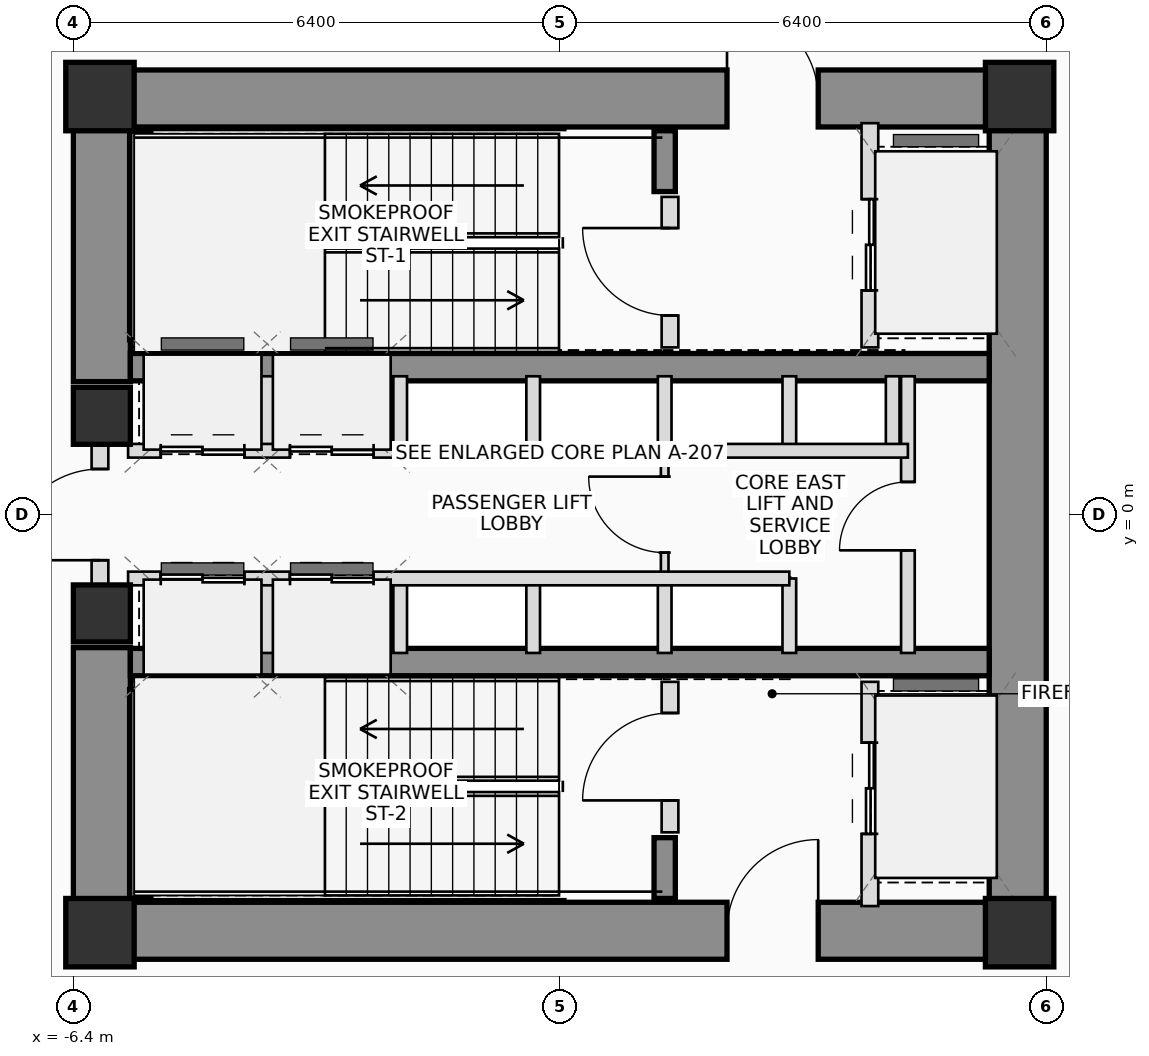
"""IFC4 building model, lengths in metres.
Left out: names, types, materials, properties, quantities, classifications, styles, units other than length and angle.
Written with IfcOpenShell. Run it as: python <this file> out.ifc"""

import sys

from ifc_helpers import new_model, si_unit, direction, frame, frame_2d, origin, origin_2d, place, context, subcontext, project, spatial, rectangle, extrude, source, transform, mapped, element, fill, save


model = new_model("IFC4")
c1 = context("Model", 3, precision=1e-05, world=origin(), true_north=direction((0.0, 1.0)))
c2 = subcontext(c1, "Body", "Model", "MODEL_VIEW")
j1 = project(units=[si_unit("LENGTHUNIT", "METRE"), si_unit("PLANEANGLEUNIT", "RADIAN")], contexts=[c1])
p1 = place(None, origin())
s1 = spatial("IfcSite", under=j1, at=p1, CompositionType="ELEMENT")
p2 = place(p1, origin())
s2 = spatial("IfcBuilding", under=s1, at=p2, CompositionType="ELEMENT")
p3 = place(p2, frame((0.0, 0.0, 77.3)))
s3 = spatial("IfcBuildingStorey", under=s2, at=p3, CompositionType="ELEMENT", Elevation=77.3)
m1 = source(origin(), c2, "Body", "SweptSolid", [
    extrude(rectangle(XDim=0.9, YDim=0.9, at=origin_2d()), origin(), (0.0, 0.0, 1.0), 3.75),
])
for number, where, z_axis, x_axis in (
    (1, (-6.05, -5.5, 0.0), (0.0, 0.0, 1.0), (1.0, 0.0, 0.0)),
    (2, (6.05, -5.5, 0.0), (0.0, 0.0, 1.0), (1.0, 0.0, 0.0)),
    (3, (6.05, 5.5, 0.0), (0.0, 0.0, 1.0), (1.0, 0.0, 0.0)),
    (4, (-6.05, 5.5, 0.0), (0.0, 0.0, 1.0), (1.0, 0.0, 0.0)),
):
    element("IfcColumn", number, at=place(p3, frame(where, z_axis=z_axis, x_axis=x_axis)), inside=s3, PredefinedType="COLUMN", context=c2, shape_type="MappedRepresentation", body=[
        mapped(m1, transform((0.0, 0.0, 0.0), scale=1.0)),
    ])
p4 = place(p3, frame((-6.4, 5.475, 0.0), z_axis=(0.0, 0.0, 1.0), x_axis=(1.0, 0.0, 0.0)))
e5 = element("IfcWall", 5, at=p4, inside=s3, PredefinedType="SHEAR", context=c2, shape_type="SweptSolid", body=[
    extrude(rectangle(XDim=12.8, YDim=0.75, at=frame_2d((6.4, 0.0))), origin(), (0.0, 0.0, 1.0), 3.75),
])
p5 = place(p4, frame((8.6, 0.0, 0.0)))
e6 = element("IfcOpeningElement", 6, at=p5, cuts=e5, PredefinedType="OPENING", context=c2, shape_type="SweptSolid", body=[
    extrude(rectangle(XDim=1.2, YDim=2.2, at=frame_2d((0.6, 1.1))), frame((0.0, 0.385, 0.0), z_axis=(0.0, -1.0, 0.0), x_axis=(1.0, 0.0, 0.0)), (0.0, 0.0, 1.0), 0.77),
])
p6 = place(p3, frame((-6.4, -5.475, 0.0), z_axis=(0.0, 0.0, 1.0), x_axis=(1.0, 0.0, 0.0)))
e7 = element("IfcWall", 7, at=p6, inside=s3, PredefinedType="SHEAR", context=c2, shape_type="SweptSolid", body=[
    extrude(rectangle(XDim=12.8, YDim=0.75, at=frame_2d((6.4, 0.0))), origin(), (0.0, 0.0, 1.0), 3.75),
])
p7 = place(p6, frame((8.6, 0.0, 0.0)))
e8 = element("IfcOpeningElement", 8, at=p7, cuts=e7, PredefinedType="OPENING", context=c2, shape_type="SweptSolid", body=[
    extrude(rectangle(XDim=1.2, YDim=2.2, at=frame_2d((0.6, 1.1))), frame((0.0, 0.385, 0.0), z_axis=(0.0, -1.0, 0.0), x_axis=(1.0, 0.0, 0.0)), (0.0, 0.0, 1.0), 0.77),
])
p8 = place(p3, frame((6.025, -5.1, 0.0), z_axis=(0.0, 0.0, 1.0), x_axis=(0.0, 1.0, 0.0)))
e9 = element("IfcWall", 9, at=p8, inside=s3, PredefinedType="SHEAR", context=c2, shape_type="SweptSolid", body=[
    extrude(rectangle(XDim=10.2, YDim=0.75, at=frame_2d((5.1, 0.0))), origin(), (0.0, 0.0, 1.0), 3.75),
])
for number, where, z_axis, x_axis in (
    (10, (-6.025, -5.1, 0.0), (0.0, 0.0, 1.0), (0.0, 1.0, 0.0)),
    (11, (-6.025, 1.75, 0.0), (0.0, 0.0, 1.0), (0.0, 1.0, 0.0)),
):
    element("IfcWall", number, at=place(p3, frame(where, z_axis=z_axis, x_axis=x_axis)), inside=s3, PredefinedType="SHEAR", context=c2, shape_type="SweptSolid", body=[
        extrude(rectangle(XDim=3.35, YDim=0.75, at=frame_2d((1.675, 0.0))), origin(), (0.0, 0.0, 1.0), 3.75),
    ])
for number, where, z_axis, x_axis in (
    (12, (-5.65, 1.94, 0.0), (0.0, 0.0, 1.0), (1.0, 0.0, 0.0)),
    (13, (-5.65, -1.94, 0.0), (0.0, 0.0, 1.0), (1.0, 0.0, 0.0)),
):
    element("IfcWall", number, at=place(p3, frame(where, z_axis=z_axis, x_axis=x_axis)), inside=s3, PredefinedType="SHEAR", context=c2, shape_type="SweptSolid", body=[
        extrude(rectangle(XDim=11.3, YDim=0.36, at=frame_2d((5.65, 0.0))), origin(), (0.0, 0.0, 1.0), 3.75),
    ])
p9 = place(p3, frame((-5.52, 2.3, 0.0), z_axis=(0.0, 0.0, 1.0), x_axis=(0.0, 1.0, 0.0)))
e14 = element("IfcWall", 14, at=p9, inside=s3, PredefinedType="SHEAR", context=c2, shape_type="SweptSolid", body=[
    extrude(rectangle(XDim=2.75, YDim=0.28, at=frame_2d((1.375, 0.0))), origin(), (0.0, 0.0, 1.0), 3.75),
])
p10 = place(p3, frame((1.38, 4.25, 0.0), z_axis=(0.0, 0.0, 1.0), x_axis=(0.0, 1.0, 0.0)))
e15 = element("IfcWall", 15, at=p10, inside=s3, PredefinedType="SHEAR", context=c2, shape_type="SweptSolid", body=[
    extrude(rectangle(XDim=0.8, YDim=0.28, at=frame_2d((0.4, 0.0))), origin(), (0.0, 0.0, 1.0), 3.75),
])
p11 = place(p3, frame((-5.52, -5.05, 0.0), z_axis=(0.0, 0.0, 1.0), x_axis=(0.0, 1.0, 0.0)))
e16 = element("IfcWall", 16, at=p11, inside=s3, PredefinedType="SHEAR", context=c2, shape_type="SweptSolid", body=[
    extrude(rectangle(XDim=2.75, YDim=0.28, at=frame_2d((1.375, 0.0))), origin(), (0.0, 0.0, 1.0), 3.75),
])
p12 = place(p3, frame((1.38, -5.05, 0.0), z_axis=(0.0, 0.0, 1.0), x_axis=(0.0, 1.0, 0.0)))
e17 = element("IfcWall", 17, at=p12, inside=s3, PredefinedType="SHEAR", context=c2, shape_type="SweptSolid", body=[
    extrude(rectangle(XDim=0.8, YDim=0.28, at=frame_2d((0.4, 0.0))), origin(), (0.0, 0.0, 1.0), 3.75),
])
m2 = source(origin(), c2, "Body", "SweptSolid", [
    extrude(rectangle(XDim=0.75, YDim=0.75, at=origin_2d()), origin(), (0.0, 0.0, 1.0), 3.75),
])
for number, where, z_axis, x_axis in (
    (18, (-6.025, -1.3, 0.0), (0.0, 0.0, 1.0), (1.0, 0.0, 0.0)),
    (19, (-6.025, 1.3, 0.0), (0.0, 0.0, 1.0), (1.0, 0.0, 0.0)),
):
    element("IfcColumn", number, at=place(p3, frame(where, z_axis=z_axis, x_axis=x_axis)), inside=s3, PredefinedType="COLUMN", context=c2, shape_type="MappedRepresentation", body=[
        mapped(m2, transform((0.0, 0.0, 0.0), scale=1.0)),
    ])
p13 = place(p3, frame((-6.05, -0.95, 0.0), z_axis=(0.0, 0.0, 1.0), x_axis=(0.0, 1.0, 0.0)))
e20 = element("IfcWall", 20, at=p13, inside=s3, PredefinedType="PLUMBINGWALL", context=c2, shape_type="SweptSolid", body=[
    extrude(rectangle(XDim=1.9, YDim=0.22, at=frame_2d((0.95, 0.0))), origin(), (0.0, 0.0, 1.0), 2.525),
])
p14 = place(p13, frame((0.35, 0.0, 0.0)))
e21 = element("IfcOpeningElement", 21, at=p14, cuts=e20, PredefinedType="OPENING", context=c2, shape_type="SweptSolid", body=[
    extrude(rectangle(XDim=1.2, YDim=2.2, at=frame_2d((0.6, 1.1))), frame((0.0, 0.12, 0.0), z_axis=(0.0, -1.0, 0.0), x_axis=(1.0, 0.0, 0.0)), (0.0, 0.0, 1.0), 0.24),
])
p15 = place(p3, frame((1.45, 2.2, 0.0), z_axis=(0.0, 0.0, 1.0), x_axis=(0.0, 1.0, 0.0)))
e22 = element("IfcWall", 22, at=p15, inside=s3, PredefinedType="PLUMBINGWALL", context=c2, shape_type="SweptSolid", body=[
    extrude(rectangle(XDim=1.98, YDim=0.22, at=frame_2d((0.99, 0.0))), origin(), (0.0, 0.0, 1.0), 3.545),
])
p16 = place(p15, frame((0.42, 0.0, 0.0)))
e23 = element("IfcOpeningElement", 23, at=p16, cuts=e22, PredefinedType="OPENING", context=c2, shape_type="SweptSolid", body=[
    extrude(rectangle(XDim=1.15, YDim=2.15, at=frame_2d((0.575, 1.075))), frame((0.0, 0.12, 0.0), z_axis=(0.0, -1.0, 0.0), x_axis=(1.0, 0.0, 0.0)), (0.0, 0.0, 1.0), 0.24),
])
p17 = place(p3, frame((4.08, 2.2, 0.0), z_axis=(0.0, 0.0, 1.0), x_axis=(0.0, 1.0, 0.0)))
e24 = element("IfcWall", 24, at=p17, inside=s3, PredefinedType="PLUMBINGWALL", context=c2, shape_type="SweptSolid", body=[
    extrude(rectangle(XDim=2.95, YDim=0.22, at=frame_2d((1.475, 0.0))), origin(), (0.0, 0.0, 1.0), 3.545),
])
p18 = place(p17, frame((0.75, 0.0, 0.0)))
e25 = element("IfcOpeningElement", 25, at=p18, cuts=e24, PredefinedType="OPENING", context=c2, shape_type="SweptSolid", body=[
    extrude(rectangle(XDim=1.2, YDim=2.25, at=frame_2d((0.6, 1.125))), frame((0.0, 0.12, 0.0), z_axis=(0.0, -1.0, 0.0), x_axis=(1.0, 0.0, 0.0)), (0.0, 0.0, 1.0), 0.24),
])
p19 = place(p3, frame((1.45, -4.18, 0.0), z_axis=(0.0, 0.0, 1.0), x_axis=(0.0, 1.0, 0.0)))
e26 = element("IfcWall", 26, at=p19, inside=s3, PredefinedType="PLUMBINGWALL", context=c2, shape_type="SweptSolid", body=[
    extrude(rectangle(XDim=1.98, YDim=0.22, at=frame_2d((0.99, 0.0))), origin(), (0.0, 0.0, 1.0), 3.545),
])
p20 = place(p19, frame((0.42, 0.0, 0.0)))
e27 = element("IfcOpeningElement", 27, at=p20, cuts=e26, PredefinedType="OPENING", context=c2, shape_type="SweptSolid", body=[
    extrude(rectangle(XDim=1.15, YDim=2.15, at=frame_2d((0.575, 1.075))), frame((0.0, 0.12, 0.0), z_axis=(0.0, -1.0, 0.0), x_axis=(1.0, 0.0, 0.0)), (0.0, 0.0, 1.0), 0.24),
])
p21 = place(p3, frame((4.08, -5.15, 0.0), z_axis=(0.0, 0.0, 1.0), x_axis=(0.0, 1.0, 0.0)))
e28 = element("IfcWall", 28, at=p21, inside=s3, PredefinedType="PLUMBINGWALL", context=c2, shape_type="SweptSolid", body=[
    extrude(rectangle(XDim=2.95, YDim=0.22, at=frame_2d((1.475, 0.0))), origin(), (0.0, 0.0, 1.0), 3.545),
])
p22 = place(p21, frame((0.95, 0.0, 0.0)))
e29 = element("IfcOpeningElement", 29, at=p22, cuts=e28, PredefinedType="OPENING", context=c2, shape_type="SweptSolid", body=[
    extrude(rectangle(XDim=1.2, YDim=2.25, at=frame_2d((0.6, 1.125))), frame((0.0, 0.12, 0.0), z_axis=(0.0, -1.0, 0.0), x_axis=(1.0, 0.0, 0.0)), (0.0, 0.0, 1.0), 0.24),
])
p23 = place(p3, frame((1.38, -0.84, 0.0), z_axis=(0.0, 0.0, 1.0), x_axis=(0.0, 1.0, 0.0)))
e30 = element("IfcWall", 30, at=p23, inside=s3, PredefinedType="PARTITIONING", context=c2, shape_type="SweptSolid", body=[
    extrude(rectangle(XDim=1.68, YDim=0.1, at=frame_2d((0.84, 0.0))), origin(), (0.0, 0.0, 1.0), 3.545),
])
p24 = place(p23, frame((0.34, 0.0, 0.0)))
e31 = element("IfcOpeningElement", 31, at=p24, cuts=e30, PredefinedType="OPENING", context=c2, shape_type="SweptSolid", body=[
    extrude(rectangle(XDim=1.0, YDim=2.25, at=frame_2d((0.5, 1.125))), frame((0.0, 0.06, 0.0), z_axis=(0.0, -1.0, 0.0), x_axis=(1.0, 0.0, 0.0)), (0.0, 0.0, 1.0), 0.12),
])
for number, where, z_axis, x_axis in (
    (32, (-3.85, 0.84, 0.0), (0.0, 0.0, 1.0), (0.0, 1.0, 0.0)),
    (33, (-3.85, -1.82, 0.0), (0.0, 0.0, 1.0), (0.0, 1.0, 0.0)),
    (34, (-2.1, 0.84, 0.0), (0.0, 0.0, 1.0), (0.0, 1.0, 0.0)),
    (35, (-2.1, -1.82, 0.0), (0.0, 0.0, 1.0), (0.0, 1.0, 0.0)),
    (36, (-0.35, 0.84, 0.0), (0.0, 0.0, 1.0), (0.0, 1.0, 0.0)),
    (37, (-0.35, -1.82, 0.0), (0.0, 0.0, 1.0), (0.0, 1.0, 0.0)),
    (38, (1.38, 0.84, 0.0), (0.0, 0.0, 1.0), (0.0, 1.0, 0.0)),
    (39, (1.38, -1.82, 0.0), (0.0, 0.0, 1.0), (0.0, 1.0, 0.0)),
    (40, (3.02, 0.84, 0.0), (0.0, 0.0, 1.0), (0.0, 1.0, 0.0)),
    (41, (4.38, 0.84, 0.0), (0.0, 0.0, 1.0), (0.0, 1.0, 0.0)),
    (42, (3.02, -1.82, 0.0), (0.0, 0.0, 1.0), (0.0, 1.0, 0.0)),
):
    element("IfcWall", number, at=place(p3, frame(where, z_axis=z_axis, x_axis=x_axis)), inside=s3, PredefinedType="PLUMBINGWALL", context=c2, shape_type="SweptSolid", body=[
        extrude(rectangle(XDim=0.98, YDim=0.18, at=frame_2d((0.49, 0.0))), origin(), (0.0, 0.0, 1.0), 3.545),
    ])
p25 = place(p3, frame((4.58, -1.82, 0.0), z_axis=(0.0, 0.0, 1.0), x_axis=(0.0, 1.0, 0.0)))
e43 = element("IfcWall", 43, at=p25, inside=s3, PredefinedType="PLUMBINGWALL", context=c2, shape_type="SweptSolid", body=[
    extrude(rectangle(XDim=3.64, YDim=0.18, at=frame_2d((1.82, 0.0))), origin(), (0.0, 0.0, 1.0), 3.545),
])
p26 = place(p25, frame((1.35, 0.0, 0.0)))
e44 = element("IfcOpeningElement", 44, at=p26, cuts=e43, PredefinedType="OPENING", context=c2, shape_type="SweptSolid", body=[
    extrude(rectangle(XDim=0.9, YDim=2.05, at=frame_2d((0.45, 1.025))), frame((0.0, 0.1, 0.0), z_axis=(0.0, -1.0, 0.0), x_axis=(1.0, 0.0, 0.0)), (0.0, 0.0, 1.0), 0.2),
])
p27 = place(p3, frame((-5.68, 0.84, 0.0), z_axis=(0.0, 0.0, 1.0), x_axis=(1.0, 0.0, 0.0)))
e45 = element("IfcWall", 45, at=p27, inside=s3, PredefinedType="PLUMBINGWALL", context=c2, shape_type="SweptSolid", body=[
    extrude(rectangle(XDim=10.26, YDim=0.18, at=frame_2d((5.13, 0.0))), origin(), (0.0, 0.0, 1.0), 3.545),
])
p28 = place(p27, frame((0.43, 0.0, 0.0)))
e46 = element("IfcOpeningElement", 46, at=p28, cuts=e45, PredefinedType="OPENING", context=c2, shape_type="SweptSolid", body=[
    extrude(rectangle(XDim=1.1, YDim=2.2, at=frame_2d((0.55, 1.1))), frame((0.0, 0.1, 0.0), z_axis=(0.0, -1.0, 0.0), x_axis=(1.0, 0.0, 0.0)), (0.0, 0.0, 1.0), 0.2),
])
p29 = place(p27, frame((2.13, 0.0, 0.0)))
e47 = element("IfcOpeningElement", 47, at=p29, cuts=e45, PredefinedType="OPENING", context=c2, shape_type="SweptSolid", body=[
    extrude(rectangle(XDim=1.1, YDim=2.2, at=frame_2d((0.55, 1.1))), frame((0.0, 0.1, 0.0), z_axis=(0.0, -1.0, 0.0), x_axis=(1.0, 0.0, 0.0)), (0.0, 0.0, 1.0), 0.2),
])
p30 = place(p3, frame((-5.68, -0.84, 0.0), z_axis=(0.0, 0.0, 1.0), x_axis=(1.0, 0.0, 0.0)))
e48 = element("IfcWall", 48, at=p30, inside=s3, PredefinedType="PLUMBINGWALL", context=c2, shape_type="SweptSolid", body=[
    extrude(rectangle(XDim=8.7, YDim=0.18, at=frame_2d((4.35, 0.0))), origin(), (0.0, 0.0, 1.0), 3.545),
])
p31 = place(p30, frame((0.43, 0.0, 0.0)))
e49 = element("IfcOpeningElement", 49, at=p31, cuts=e48, PredefinedType="OPENING", context=c2, shape_type="SweptSolid", body=[
    extrude(rectangle(XDim=1.1, YDim=2.2, at=frame_2d((0.55, 1.1))), frame((0.0, 0.1, 0.0), z_axis=(0.0, -1.0, 0.0), x_axis=(1.0, 0.0, 0.0)), (0.0, 0.0, 1.0), 0.2),
])
p32 = place(p30, frame((2.13, 0.0, 0.0)))
e50 = element("IfcOpeningElement", 50, at=p32, cuts=e48, PredefinedType="OPENING", context=c2, shape_type="SweptSolid", body=[
    extrude(rectangle(XDim=1.1, YDim=2.2, at=frame_2d((0.55, 1.1))), frame((0.0, 0.1, 0.0), z_axis=(0.0, -1.0, 0.0), x_axis=(1.0, 0.0, 0.0)), (0.0, 0.0, 1.0), 0.2),
])
p33 = place(p5, origin())
e51 = element("IfcDoor", 51, at=p33, inside=s3, OperationType="SINGLE_SWING_LEFT", PredefinedType="DOOR", context=c2, shape_type="SweptSolid", body=[
    extrude(rectangle(XDim=1.2, YDim=2.2, at=frame_2d((0.6, 1.1))), frame((0.0, 0.025, 0.0), z_axis=(0.0, -1.0, 0.0), x_axis=(1.0, 0.0, 0.0)), (0.0, 0.0, 1.0), 0.05),
])
fill(e6, e51)
p34 = place(p7, origin())
e52 = element("IfcDoor", 52, at=p34, inside=s3, OperationType="SINGLE_SWING_RIGHT", PredefinedType="DOOR", context=c2, shape_type="SweptSolid", body=[
    extrude(rectangle(XDim=1.2, YDim=2.2, at=frame_2d((0.6, 1.1))), frame((0.0, 0.025, 0.0), z_axis=(0.0, -1.0, 0.0), x_axis=(1.0, 0.0, 0.0)), (0.0, 0.0, 1.0), 0.05),
])
fill(e8, e52)
p35 = place(p14, origin())
e53 = element("IfcDoor", 53, at=p35, inside=s3, OperationType="SINGLE_SWING_LEFT", PredefinedType="DOOR", context=c2, shape_type="SweptSolid", body=[
    extrude(rectangle(XDim=1.2, YDim=2.2, at=frame_2d((0.6, 1.1))), frame((0.0, 0.025, 0.0), z_axis=(0.0, -1.0, 0.0), x_axis=(1.0, 0.0, 0.0)), (0.0, 0.0, 1.0), 0.05),
])
fill(e21, e53)
p36 = place(p16, origin())
e54 = element("IfcDoor", 54, at=p36, inside=s3, OperationType="SINGLE_SWING_RIGHT", PredefinedType="DOOR", context=c2, shape_type="SweptSolid", body=[
    extrude(rectangle(XDim=1.15, YDim=2.15, at=frame_2d((0.575, 1.075))), frame((0.0, 0.025, 0.0), z_axis=(0.0, -1.0, 0.0), x_axis=(1.0, 0.0, 0.0)), (0.0, 0.0, 1.0), 0.05),
])
fill(e23, e54)
p37 = place(p18, origin())
e55 = element("IfcDoor", 55, at=p37, inside=s3, OperationType="DOUBLE_DOOR_SLIDING", PredefinedType="DOOR", context=c2, shape_type="SweptSolid", body=[
    extrude(rectangle(XDim=1.2, YDim=2.25, at=frame_2d((0.6, 1.125))), frame((0.0, 0.025, 0.0), z_axis=(0.0, -1.0, 0.0), x_axis=(1.0, 0.0, 0.0)), (0.0, 0.0, 1.0), 0.05),
])
fill(e25, e55)
p38 = place(p20, origin())
e56 = element("IfcDoor", 56, at=p38, inside=s3, OperationType="SINGLE_SWING_LEFT", PredefinedType="DOOR", context=c2, shape_type="SweptSolid", body=[
    extrude(rectangle(XDim=1.15, YDim=2.15, at=frame_2d((0.575, 1.075))), frame((0.0, 0.025, 0.0), z_axis=(0.0, -1.0, 0.0), x_axis=(1.0, 0.0, 0.0)), (0.0, 0.0, 1.0), 0.05),
])
fill(e27, e56)
p39 = place(p22, origin())
e57 = element("IfcDoor", 57, at=p39, inside=s3, OperationType="DOUBLE_DOOR_SLIDING", PredefinedType="DOOR", context=c2, shape_type="SweptSolid", body=[
    extrude(rectangle(XDim=1.2, YDim=2.25, at=frame_2d((0.6, 1.125))), frame((0.0, 0.025, 0.0), z_axis=(0.0, -1.0, 0.0), x_axis=(1.0, 0.0, 0.0)), (0.0, 0.0, 1.0), 0.05),
])
fill(e29, e57)
p40 = place(p24, origin())
e58 = element("IfcDoor", 58, at=p40, inside=s3, OperationType="SINGLE_SWING_RIGHT", PredefinedType="DOOR", context=c2, shape_type="SweptSolid", body=[
    extrude(rectangle(XDim=1.0, YDim=2.25, at=frame_2d((0.5, 1.125))), frame((0.0, 0.025, 0.0), z_axis=(0.0, -1.0, 0.0), x_axis=(1.0, 0.0, 0.0)), (0.0, 0.0, 1.0), 0.05),
])
fill(e31, e58)
p41 = place(p26, origin())
e59 = element("IfcDoor", 59, at=p41, inside=s3, OperationType="SINGLE_SWING_LEFT", PredefinedType="DOOR", context=c2, shape_type="SweptSolid", body=[
    extrude(rectangle(XDim=0.9, YDim=2.05, at=frame_2d((0.45, 1.025))), frame((0.0, 0.025, 0.0), z_axis=(0.0, -1.0, 0.0), x_axis=(1.0, 0.0, 0.0)), (0.0, 0.0, 1.0), 0.05),
])
fill(e44, e59)
p42 = place(p28, origin())
e60 = element("IfcDoor", 60, at=p42, inside=s3, OperationType="DOUBLE_DOOR_SLIDING", PredefinedType="DOOR", context=c2, shape_type="SweptSolid", body=[
    extrude(rectangle(XDim=1.1, YDim=2.2, at=frame_2d((0.55, 1.1))), frame((0.0, 0.025, 0.0), z_axis=(0.0, -1.0, 0.0), x_axis=(1.0, 0.0, 0.0)), (0.0, 0.0, 1.0), 0.05),
])
fill(e46, e60)
p43 = place(p29, origin())
e61 = element("IfcDoor", 61, at=p43, inside=s3, OperationType="DOUBLE_DOOR_SLIDING", PredefinedType="DOOR", context=c2, shape_type="SweptSolid", body=[
    extrude(rectangle(XDim=1.1, YDim=2.2, at=frame_2d((0.55, 1.1))), frame((0.0, 0.025, 0.0), z_axis=(0.0, -1.0, 0.0), x_axis=(1.0, 0.0, 0.0)), (0.0, 0.0, 1.0), 0.05),
])
fill(e47, e61)
p44 = place(p31, origin())
e62 = element("IfcDoor", 62, at=p44, inside=s3, OperationType="DOUBLE_DOOR_SLIDING", PredefinedType="DOOR", context=c2, shape_type="SweptSolid", body=[
    extrude(rectangle(XDim=1.1, YDim=2.2, at=frame_2d((0.55, 1.1))), frame((0.0, 0.025, 0.0), z_axis=(0.0, -1.0, 0.0), x_axis=(1.0, 0.0, 0.0)), (0.0, 0.0, 1.0), 0.05),
])
fill(e49, e62)
p45 = place(p32, origin())
e63 = element("IfcDoor", 63, at=p45, inside=s3, OperationType="DOUBLE_DOOR_SLIDING", PredefinedType="DOOR", context=c2, shape_type="SweptSolid", body=[
    extrude(rectangle(XDim=1.1, YDim=2.2, at=frame_2d((0.55, 1.1))), frame((0.0, 0.025, 0.0), z_axis=(0.0, -1.0, 0.0), x_axis=(1.0, 0.0, 0.0)), (0.0, 0.0, 1.0), 0.05),
])
fill(e50, e63)
save(model, sys.argv[1])
